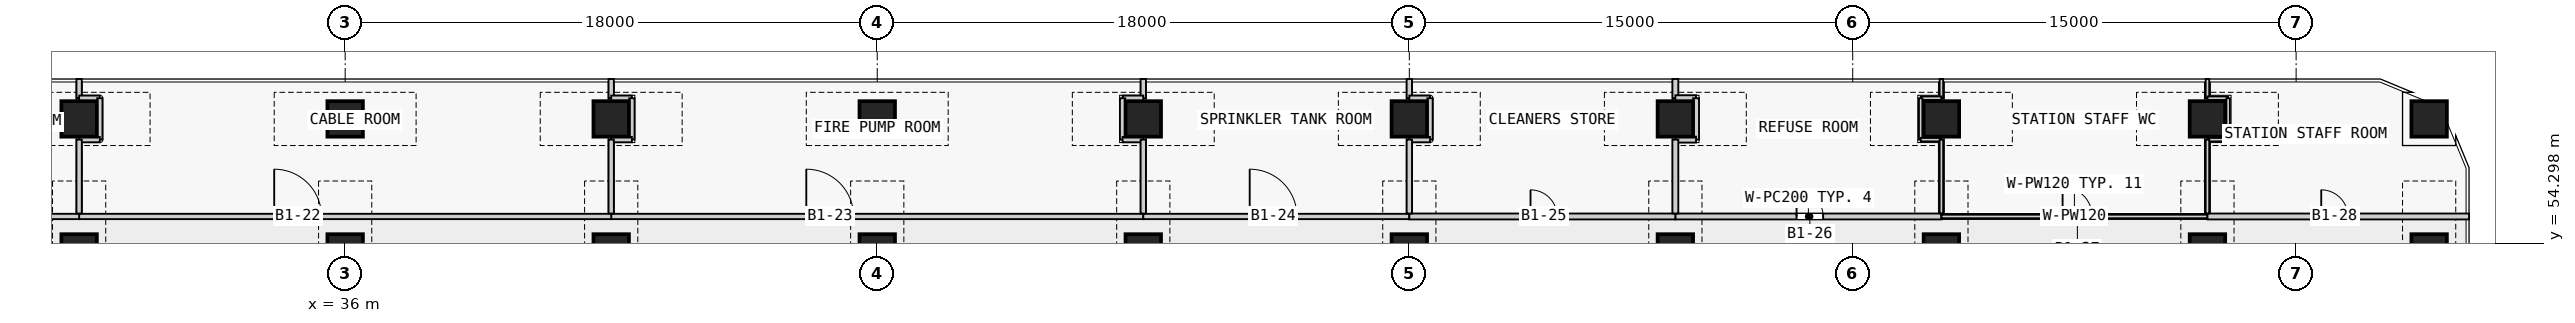
"""IFC4 building model, lengths in metres.
Left out: names, types, materials, properties, quantities, classifications, styles, units other than length and angle.
Written with IfcOpenShell. Run it as: python <this file> out.ifc"""

import sys

from ifc_helpers import new_model, si_unit, direction, frame, frame_2d, origin, origin_2d, place, context, subcontext, project, spatial, rectangle, extrude, element, fill, save


model = new_model("IFC4")
c1 = context("Model", 3, precision=1e-05, world=origin(), true_north=direction((0.0, 1.0)))
c2 = subcontext(c1, "Body", "Model", "MODEL_VIEW")
j1 = project(units=[si_unit("LENGTHUNIT", "METRE"), si_unit("PLANEANGLEUNIT", "RADIAN")], contexts=[c1])
p1 = place(None, origin())
s1 = spatial("IfcSite", under=j1, at=p1, CompositionType="ELEMENT")
p2 = place(p1, origin())
s2 = spatial("IfcBuilding", under=s1, at=p2, CompositionType="ELEMENT")
p3 = place(p2, frame((0.0, 0.0, -7.0)))
s3 = spatial("IfcBuildingStorey", under=s2, at=p3, CompositionType="ELEMENT", Elevation=-7.0)
for number, where, z_axis, x_axis in (
    (1, (27.0, 54.0, 0.0), (0.0, 0.0, 1.0), (1.0, 0.0, 0.0)),
    (2, (27.0, 58.5, 0.0), (0.0, 0.0, 1.0), (1.0, 0.0, 0.0)),
    (3, (36.0, 54.0, 0.0), (0.0, 0.0, 1.0), (1.0, 0.0, 0.0)),
    (4, (36.0, 58.5, 0.0), (0.0, 0.0, 1.0), (1.0, 0.0, 0.0)),
    (5, (45.0, 54.0, 0.0), (0.0, 0.0, 1.0), (1.0, 0.0, 0.0)),
    (6, (45.0, 58.5, 0.0), (0.0, 0.0, 1.0), (1.0, 0.0, 0.0)),
    (7, (54.0, 54.0, 0.0), (0.0, 0.0, 1.0), (1.0, 0.0, 0.0)),
    (8, (54.0, 58.5, 0.0), (0.0, 0.0, 1.0), (1.0, 0.0, 0.0)),
    (9, (63.0, 54.0, 0.0), (0.0, 0.0, 1.0), (1.0, 0.0, 0.0)),
    (10, (63.0, 58.5, 0.0), (0.0, 0.0, 1.0), (1.0, 0.0, 0.0)),
    (11, (72.0, 54.0, 0.0), (0.0, 0.0, 1.0), (1.0, 0.0, 0.0)),
    (12, (72.0, 58.5, 0.0), (0.0, 0.0, 1.0), (1.0, 0.0, 0.0)),
    (13, (81.0, 54.0, 0.0), (0.0, 0.0, 1.0), (1.0, 0.0, 0.0)),
    (14, (81.0, 58.5, 0.0), (0.0, 0.0, 1.0), (1.0, 0.0, 0.0)),
    (15, (90.0, 54.0, 0.0), (0.0, 0.0, 1.0), (1.0, 0.0, 0.0)),
    (16, (90.0, 58.5, 0.0), (0.0, 0.0, 1.0), (1.0, 0.0, 0.0)),
    (17, (99.0, 54.0, 0.0), (0.0, 0.0, 1.0), (1.0, 0.0, 0.0)),
    (18, (99.0, 58.5, 0.0), (0.0, 0.0, 1.0), (1.0, 0.0, 0.0)),
    (19, (106.5, 54.0, 0.0), (0.0, 0.0, 1.0), (1.0, 0.0, 0.0)),
    (20, (106.5, 58.5, 0.0), (0.0, 0.0, 1.0), (1.0, 0.0, 0.0)),
):
    element("IfcColumn", number, at=place(p3, frame(where, z_axis=z_axis, x_axis=x_axis)), inside=s3, PredefinedType="COLUMN", context=c2, shape_type="SweptSolid", body=[
        extrude(rectangle(XDim=1.2, YDim=1.2, at=origin_2d()), origin(), (0.0, 0.0, 1.0), 7.0),
    ])
p4 = place(p3, frame((45.0, 55.2, 0.0), z_axis=(0.0, 0.0, 1.0), x_axis=(1.0, 0.0, 0.0)))
e21 = element("IfcWall", 21, at=p4, inside=s3, PredefinedType="PARTITIONING", context=c2, shape_type="SweptSolid", body=[
    extrude(rectangle(XDim=18.0, YDim=0.18, at=frame_2d((9.0, 0.0))), origin(), (0.0, 0.0, 1.0), 6.55),
])
p5 = place(p4, frame((6.6, 0.0, 0.0)))
e22 = element("IfcOpeningElement", 22, at=p5, cuts=e21, PredefinedType="OPENING", context=c2, shape_type="SweptSolid", body=[
    extrude(rectangle(XDim=1.6, YDim=2.4, at=frame_2d((0.8, 1.2))), frame((0.0, 0.1, 0.0), z_axis=(0.0, -1.0, 0.0), x_axis=(1.0, 0.0, 0.0)), (0.0, 0.0, 1.0), 0.2),
])
p6 = place(p3, frame((27.0, 55.2, 0.0), z_axis=(0.0, 0.0, 1.0), x_axis=(1.0, 0.0, 0.0)))
e23 = element("IfcWall", 23, at=p6, inside=s3, PredefinedType="PARTITIONING", context=c2, shape_type="SweptSolid", body=[
    extrude(rectangle(XDim=18.0, YDim=0.18, at=frame_2d((9.0, 0.0))), origin(), (0.0, 0.0, 1.0), 6.55),
])
p7 = place(p6, frame((6.6, 0.0, 0.0)))
e24 = element("IfcOpeningElement", 24, at=p7, cuts=e23, PredefinedType="OPENING", context=c2, shape_type="SweptSolid", body=[
    extrude(rectangle(XDim=1.6, YDim=2.4, at=frame_2d((0.8, 1.2))), frame((0.0, 0.1, 0.0), z_axis=(0.0, -1.0, 0.0), x_axis=(1.0, 0.0, 0.0)), (0.0, 0.0, 1.0), 0.2),
])
p8 = place(p3, frame((9.0, 55.2, 0.0), z_axis=(0.0, 0.0, 1.0), x_axis=(1.0, 0.0, 0.0)))
e25 = element("IfcWall", 25, at=p8, inside=s3, PredefinedType="PARTITIONING", context=c2, shape_type="SweptSolid", body=[
    extrude(rectangle(XDim=18.0, YDim=0.18, at=frame_2d((9.0, 0.0))), origin(), (0.0, 0.0, 1.0), 6.55),
])
p9 = place(p8, frame((6.35, 0.0, 0.0)))
e26 = element("IfcOpeningElement", 26, at=p9, cuts=e25, PredefinedType="OPENING", context=c2, shape_type="SweptSolid", body=[
    extrude(rectangle(XDim=1.6, YDim=2.4, at=frame_2d((0.8, 1.2))), frame((0.0, 0.1, 0.0), z_axis=(0.0, -1.0, 0.0), x_axis=(1.0, 0.0, 0.0)), (0.0, 0.0, 1.0), 0.2),
])
p10 = place(p3, frame((81.0, 55.2, 0.0), z_axis=(0.0, 0.0, 1.0), x_axis=(1.0, 0.0, 0.0)))
e27 = element("IfcWall", 27, at=p10, inside=s3, PredefinedType="PARTITIONING", context=c2, shape_type="SweptSolid", body=[
    extrude(rectangle(XDim=9.0, YDim=0.2, at=frame_2d((4.5, 0.0))), origin(), (0.0, 0.0, 1.0), 6.55),
])
p11 = place(p10, frame((4.1, 0.0, 0.0)))
e28 = element("IfcOpeningElement", 28, at=p11, cuts=e27, PredefinedType="OPENING", context=c2, shape_type="SweptSolid", body=[
    extrude(rectangle(XDim=0.9, YDim=2.1, at=frame_2d((0.45, 1.05))), frame((0.0, 0.11, 0.0), z_axis=(0.0, -1.0, 0.0), x_axis=(1.0, 0.0, 0.0)), (0.0, 0.0, 1.0), 0.22),
])
p12 = place(p3, frame((63.0, 55.2, 0.0), z_axis=(0.0, 0.0, 1.0), x_axis=(1.0, 0.0, 0.0)))
e29 = element("IfcWall", 29, at=p12, inside=s3, PredefinedType="PARTITIONING", context=c2, shape_type="SweptSolid", body=[
    extrude(rectangle(XDim=9.0, YDim=0.18, at=frame_2d((4.5, 0.0))), origin(), (0.0, 0.0, 1.0), 6.55),
])
p13 = place(p12, frame((3.6, 0.0, 0.0)))
e30 = element("IfcOpeningElement", 30, at=p13, cuts=e29, PredefinedType="OPENING", context=c2, shape_type="SweptSolid", body=[
    extrude(rectangle(XDim=1.6, YDim=2.4, at=frame_2d((0.8, 1.2))), frame((0.0, 0.1, 0.0), z_axis=(0.0, -1.0, 0.0), x_axis=(1.0, 0.0, 0.0)), (0.0, 0.0, 1.0), 0.2),
])
p14 = place(p3, frame((90.0, 55.2, 0.0), z_axis=(0.0, 0.0, 1.0), x_axis=(1.0, 0.0, 0.0)))
e31 = element("IfcWall", 31, at=p14, inside=s3, PredefinedType="PARTITIONING", context=c2, shape_type="SweptSolid", body=[
    extrude(rectangle(XDim=9.0, YDim=0.12, at=frame_2d((4.5, 0.0))), origin(), (0.0, 0.0, 1.0), 6.55),
])
p15 = place(p14, frame((4.1, 0.0, 0.0)))
e32 = element("IfcOpeningElement", 32, at=p15, cuts=e31, PredefinedType="OPENING", context=c2, shape_type="SweptSolid", body=[
    extrude(rectangle(XDim=1.0, YDim=2.1, at=frame_2d((0.5, 1.05))), frame((0.0, 0.07, 0.0), z_axis=(0.0, -1.0, 0.0), x_axis=(1.0, 0.0, 0.0)), (0.0, 0.0, 1.0), 0.14),
])
p16 = place(p3, frame((72.0, 55.2, 0.0), z_axis=(0.0, 0.0, 1.0), x_axis=(1.0, 0.0, 0.0)))
e33 = element("IfcWall", 33, at=p16, inside=s3, PredefinedType="PARTITIONING", context=c2, shape_type="SweptSolid", body=[
    extrude(rectangle(XDim=9.0, YDim=0.2, at=frame_2d((4.5, 0.0))), origin(), (0.0, 0.0, 1.0), 6.55),
])
p17 = place(p16, frame((4.1, 0.0, 0.0)))
e34 = element("IfcOpeningElement", 34, at=p17, cuts=e33, PredefinedType="OPENING", context=c2, shape_type="SweptSolid", body=[
    extrude(rectangle(XDim=0.9, YDim=2.1, at=frame_2d((0.45, 1.05))), frame((0.0, 0.11, 0.0), z_axis=(0.0, -1.0, 0.0), x_axis=(1.0, 0.0, 0.0)), (0.0, 0.0, 1.0), 0.22),
])
p18 = place(p3, frame((99.0, 55.2, 0.0), z_axis=(0.0, 0.0, 1.0), x_axis=(1.0, 0.0, 0.0)))
e35 = element("IfcWall", 35, at=p18, inside=s3, PredefinedType="PARTITIONING", context=c2, shape_type="SweptSolid", body=[
    extrude(rectangle(XDim=8.85, YDim=0.2, at=frame_2d((4.425, 0.0))), origin(), (0.0, 0.0, 1.0), 6.55),
])
p19 = place(p18, frame((3.85, 0.0, 0.0)))
e36 = element("IfcOpeningElement", 36, at=p19, cuts=e35, PredefinedType="OPENING", context=c2, shape_type="SweptSolid", body=[
    extrude(rectangle(XDim=0.9, YDim=2.1, at=frame_2d((0.45, 1.05))), frame((0.0, 0.11, 0.0), z_axis=(0.0, -1.0, 0.0), x_axis=(1.0, 0.0, 0.0)), (0.0, 0.0, 1.0), 0.22),
])
p20 = place(p3, frame((63.0, 59.85, 0.0), z_axis=(0.0, 0.0, 1.0), x_axis=(0.0, -1.0, 0.0)))
e37 = element("IfcWall", 37, at=p20, inside=s3, PredefinedType="PARTITIONING", context=c2, shape_type="SweptSolid", body=[
    extrude(rectangle(XDim=0.65, YDim=0.18, at=frame_2d((0.325, 0.0))), origin(), (0.0, 0.0, 1.0), 6.55),
])
p21 = place(p3, frame((63.0, 59.2, 0.0), z_axis=(0.0, 0.0, 1.0), x_axis=(-1.0, 0.0, 0.0)))
e38 = element("IfcWall", 38, at=p21, inside=s3, PredefinedType="PARTITIONING", context=c2, shape_type="SweptSolid", body=[
    extrude(rectangle(XDim=0.7, YDim=0.18, at=frame_2d((0.35, 0.0))), origin(), (0.0, 0.0, 1.0), 6.55),
])
p22 = place(p3, frame((62.3, 59.2, 0.0), z_axis=(0.0, 0.0, 1.0), x_axis=(0.0, -1.0, 0.0)))
e39 = element("IfcWall", 39, at=p22, inside=s3, PredefinedType="PARTITIONING", context=c2, shape_type="SweptSolid", body=[
    extrude(rectangle(XDim=1.4, YDim=0.18, at=frame_2d((0.7, 0.0))), origin(), (0.0, 0.0, 1.0), 6.55),
])
p23 = place(p3, frame((62.3, 57.8, 0.0), z_axis=(0.0, 0.0, 1.0), x_axis=(1.0, 0.0, 0.0)))
e40 = element("IfcWall", 40, at=p23, inside=s3, PredefinedType="PARTITIONING", context=c2, shape_type="SweptSolid", body=[
    extrude(rectangle(XDim=0.7, YDim=0.18, at=frame_2d((0.35, 0.0))), origin(), (0.0, 0.0, 1.0), 6.55),
])
p24 = place(p3, frame((63.0, 57.8, 0.0), z_axis=(0.0, 0.0, 1.0), x_axis=(0.0, -1.0, 0.0)))
e41 = element("IfcWall", 41, at=p24, inside=s3, PredefinedType="PARTITIONING", context=c2, shape_type="SweptSolid", body=[
    extrude(rectangle(XDim=2.5, YDim=0.18, at=frame_2d((1.25, 0.0))), origin(), (0.0, 0.0, 1.0), 6.55),
])
p25 = place(p3, frame((90.0, 59.85, 0.0), z_axis=(0.0, 0.0, 1.0), x_axis=(0.0, -1.0, 0.0)))
e42 = element("IfcWall", 42, at=p25, inside=s3, PredefinedType="PARTITIONING", context=c2, shape_type="SweptSolid", body=[
    extrude(rectangle(XDim=0.65, YDim=0.12, at=frame_2d((0.325, 0.0))), origin(), (0.0, 0.0, 1.0), 6.55),
])
p26 = place(p3, frame((90.0, 59.2, 0.0), z_axis=(0.0, 0.0, 1.0), x_axis=(-1.0, 0.0, 0.0)))
e43 = element("IfcWall", 43, at=p26, inside=s3, PredefinedType="PARTITIONING", context=c2, shape_type="SweptSolid", body=[
    extrude(rectangle(XDim=0.7, YDim=0.12, at=frame_2d((0.35, 0.0))), origin(), (0.0, 0.0, 1.0), 6.55),
])
p27 = place(p3, frame((89.3, 59.2, 0.0), z_axis=(0.0, 0.0, 1.0), x_axis=(0.0, -1.0, 0.0)))
e44 = element("IfcWall", 44, at=p27, inside=s3, PredefinedType="PARTITIONING", context=c2, shape_type="SweptSolid", body=[
    extrude(rectangle(XDim=1.4, YDim=0.12, at=frame_2d((0.7, 0.0))), origin(), (0.0, 0.0, 1.0), 6.55),
])
p28 = place(p3, frame((89.3, 57.8, 0.0), z_axis=(0.0, 0.0, 1.0), x_axis=(1.0, 0.0, 0.0)))
e45 = element("IfcWall", 45, at=p28, inside=s3, PredefinedType="PARTITIONING", context=c2, shape_type="SweptSolid", body=[
    extrude(rectangle(XDim=0.7, YDim=0.12, at=frame_2d((0.35, 0.0))), origin(), (0.0, 0.0, 1.0), 6.55),
])
p29 = place(p3, frame((90.0, 57.8, 0.0), z_axis=(0.0, 0.0, 1.0), x_axis=(0.0, -1.0, 0.0)))
e46 = element("IfcWall", 46, at=p29, inside=s3, PredefinedType="PARTITIONING", context=c2, shape_type="SweptSolid", body=[
    extrude(rectangle(XDim=2.5, YDim=0.12, at=frame_2d((1.25, 0.0))), origin(), (0.0, 0.0, 1.0), 6.55),
])
p30 = place(p3, frame((45.0, 59.85, 0.0), z_axis=(0.0, 0.0, 1.0), x_axis=(0.0, -1.0, 0.0)))
e47 = element("IfcWall", 47, at=p30, inside=s3, PredefinedType="PARTITIONING", context=c2, shape_type="SweptSolid", body=[
    extrude(rectangle(XDim=0.65, YDim=0.18, at=frame_2d((0.325, 0.0))), origin(), (0.0, 0.0, 1.0), 6.55),
])
p31 = place(p3, frame((45.0, 59.2, 0.0), z_axis=(0.0, 0.0, 1.0), x_axis=(1.0, 0.0, 0.0)))
e48 = element("IfcWall", 48, at=p31, inside=s3, PredefinedType="PARTITIONING", context=c2, shape_type="SweptSolid", body=[
    extrude(rectangle(XDim=0.7, YDim=0.18, at=frame_2d((0.35, 0.0))), origin(), (0.0, 0.0, 1.0), 6.55),
])
p32 = place(p3, frame((45.7, 59.2, 0.0), z_axis=(0.0, 0.0, 1.0), x_axis=(0.0, -1.0, 0.0)))
e49 = element("IfcWall", 49, at=p32, inside=s3, PredefinedType="PARTITIONING", context=c2, shape_type="SweptSolid", body=[
    extrude(rectangle(XDim=1.4, YDim=0.18, at=frame_2d((0.7, 0.0))), origin(), (0.0, 0.0, 1.0), 6.55),
])
p33 = place(p3, frame((45.7, 57.8, 0.0), z_axis=(0.0, 0.0, 1.0), x_axis=(-1.0, 0.0, 0.0)))
e50 = element("IfcWall", 50, at=p33, inside=s3, PredefinedType="PARTITIONING", context=c2, shape_type="SweptSolid", body=[
    extrude(rectangle(XDim=0.7, YDim=0.18, at=frame_2d((0.35, 0.0))), origin(), (0.0, 0.0, 1.0), 6.55),
])
p34 = place(p3, frame((45.0, 57.8, 0.0), z_axis=(0.0, 0.0, 1.0), x_axis=(0.0, -1.0, 0.0)))
e51 = element("IfcWall", 51, at=p34, inside=s3, PredefinedType="PARTITIONING", context=c2, shape_type="SweptSolid", body=[
    extrude(rectangle(XDim=2.5, YDim=0.18, at=frame_2d((1.25, 0.0))), origin(), (0.0, 0.0, 1.0), 6.55),
])
p35 = place(p3, frame((81.0, 59.85, 0.0), z_axis=(0.0, 0.0, 1.0), x_axis=(0.0, -1.0, 0.0)))
e52 = element("IfcWall", 52, at=p35, inside=s3, PredefinedType="PARTITIONING", context=c2, shape_type="SweptSolid", body=[
    extrude(rectangle(XDim=0.65, YDim=0.2, at=frame_2d((0.325, 0.0))), origin(), (0.0, 0.0, 1.0), 6.55),
])
p36 = place(p3, frame((81.0, 59.2, 0.0), z_axis=(0.0, 0.0, 1.0), x_axis=(1.0, 0.0, 0.0)))
e53 = element("IfcWall", 53, at=p36, inside=s3, PredefinedType="PARTITIONING", context=c2, shape_type="SweptSolid", body=[
    extrude(rectangle(XDim=0.7, YDim=0.2, at=frame_2d((0.35, 0.0))), origin(), (0.0, 0.0, 1.0), 6.55),
])
p37 = place(p3, frame((81.7, 59.2, 0.0), z_axis=(0.0, 0.0, 1.0), x_axis=(0.0, -1.0, 0.0)))
e54 = element("IfcWall", 54, at=p37, inside=s3, PredefinedType="PARTITIONING", context=c2, shape_type="SweptSolid", body=[
    extrude(rectangle(XDim=1.4, YDim=0.2, at=frame_2d((0.7, 0.0))), origin(), (0.0, 0.0, 1.0), 6.55),
])
p38 = place(p3, frame((81.7, 57.8, 0.0), z_axis=(0.0, 0.0, 1.0), x_axis=(-1.0, 0.0, 0.0)))
e55 = element("IfcWall", 55, at=p38, inside=s3, PredefinedType="PARTITIONING", context=c2, shape_type="SweptSolid", body=[
    extrude(rectangle(XDim=0.7, YDim=0.2, at=frame_2d((0.35, 0.0))), origin(), (0.0, 0.0, 1.0), 6.55),
])
p39 = place(p3, frame((81.0, 57.8, 0.0), z_axis=(0.0, 0.0, 1.0), x_axis=(0.0, -1.0, 0.0)))
e56 = element("IfcWall", 56, at=p39, inside=s3, PredefinedType="PARTITIONING", context=c2, shape_type="SweptSolid", body=[
    extrude(rectangle(XDim=2.5, YDim=0.2, at=frame_2d((1.25, 0.0))), origin(), (0.0, 0.0, 1.0), 6.55),
])
p40 = place(p3, frame((27.0, 59.85, 0.0), z_axis=(0.0, 0.0, 1.0), x_axis=(0.0, -1.0, 0.0)))
e57 = element("IfcWall", 57, at=p40, inside=s3, PredefinedType="PARTITIONING", context=c2, shape_type="SweptSolid", body=[
    extrude(rectangle(XDim=0.65, YDim=0.18, at=frame_2d((0.325, 0.0))), origin(), (0.0, 0.0, 1.0), 6.55),
])
p41 = place(p3, frame((27.0, 59.2, 0.0), z_axis=(0.0, 0.0, 1.0), x_axis=(1.0, 0.0, 0.0)))
e58 = element("IfcWall", 58, at=p41, inside=s3, PredefinedType="PARTITIONING", context=c2, shape_type="SweptSolid", body=[
    extrude(rectangle(XDim=0.7, YDim=0.18, at=frame_2d((0.35, 0.0))), origin(), (0.0, 0.0, 1.0), 6.55),
])
p42 = place(p3, frame((27.7, 59.2, 0.0), z_axis=(0.0, 0.0, 1.0), x_axis=(0.0, -1.0, 0.0)))
e59 = element("IfcWall", 59, at=p42, inside=s3, PredefinedType="PARTITIONING", context=c2, shape_type="SweptSolid", body=[
    extrude(rectangle(XDim=1.4, YDim=0.18, at=frame_2d((0.7, 0.0))), origin(), (0.0, 0.0, 1.0), 6.55),
])
p43 = place(p3, frame((27.7, 57.8, 0.0), z_axis=(0.0, 0.0, 1.0), x_axis=(-1.0, 0.0, 0.0)))
e60 = element("IfcWall", 60, at=p43, inside=s3, PredefinedType="PARTITIONING", context=c2, shape_type="SweptSolid", body=[
    extrude(rectangle(XDim=0.7, YDim=0.18, at=frame_2d((0.35, 0.0))), origin(), (0.0, 0.0, 1.0), 6.55),
])
p44 = place(p3, frame((27.0, 57.8, 0.0), z_axis=(0.0, 0.0, 1.0), x_axis=(0.0, -1.0, 0.0)))
e61 = element("IfcWall", 61, at=p44, inside=s3, PredefinedType="PARTITIONING", context=c2, shape_type="SweptSolid", body=[
    extrude(rectangle(XDim=2.5, YDim=0.18, at=frame_2d((1.25, 0.0))), origin(), (0.0, 0.0, 1.0), 6.55),
])
p45 = place(p3, frame((99.0, 59.85, 0.0), z_axis=(0.0, 0.0, 1.0), x_axis=(0.0, -1.0, 0.0)))
e62 = element("IfcWall", 62, at=p45, inside=s3, PredefinedType="PARTITIONING", context=c2, shape_type="SweptSolid", body=[
    extrude(rectangle(XDim=0.65, YDim=0.12, at=frame_2d((0.325, 0.0))), origin(), (0.0, 0.0, 1.0), 6.55),
])
p46 = place(p3, frame((99.0, 59.2, 0.0), z_axis=(0.0, 0.0, 1.0), x_axis=(1.0, 0.0, 0.0)))
e63 = element("IfcWall", 63, at=p46, inside=s3, PredefinedType="PARTITIONING", context=c2, shape_type="SweptSolid", body=[
    extrude(rectangle(XDim=0.7, YDim=0.12, at=frame_2d((0.35, 0.0))), origin(), (0.0, 0.0, 1.0), 6.55),
])
p47 = place(p3, frame((99.7, 59.2, 0.0), z_axis=(0.0, 0.0, 1.0), x_axis=(0.0, -1.0, 0.0)))
e64 = element("IfcWall", 64, at=p47, inside=s3, PredefinedType="PARTITIONING", context=c2, shape_type="SweptSolid", body=[
    extrude(rectangle(XDim=1.4, YDim=0.12, at=frame_2d((0.7, 0.0))), origin(), (0.0, 0.0, 1.0), 6.55),
])
p48 = place(p3, frame((99.7, 57.8, 0.0), z_axis=(0.0, 0.0, 1.0), x_axis=(-1.0, 0.0, 0.0)))
e65 = element("IfcWall", 65, at=p48, inside=s3, PredefinedType="PARTITIONING", context=c2, shape_type="SweptSolid", body=[
    extrude(rectangle(XDim=0.7, YDim=0.12, at=frame_2d((0.35, 0.0))), origin(), (0.0, 0.0, 1.0), 6.55),
])
p49 = place(p3, frame((99.0, 57.8, 0.0), z_axis=(0.0, 0.0, 1.0), x_axis=(0.0, -1.0, 0.0)))
e66 = element("IfcWall", 66, at=p49, inside=s3, PredefinedType="PARTITIONING", context=c2, shape_type="SweptSolid", body=[
    extrude(rectangle(XDim=2.5, YDim=0.12, at=frame_2d((1.25, 0.0))), origin(), (0.0, 0.0, 1.0), 6.55),
])
p50 = place(p3, frame((72.0, 59.85, 0.0), z_axis=(0.0, 0.0, 1.0), x_axis=(0.0, -1.0, 0.0)))
e67 = element("IfcWall", 67, at=p50, inside=s3, PredefinedType="PARTITIONING", context=c2, shape_type="SweptSolid", body=[
    extrude(rectangle(XDim=0.65, YDim=0.18, at=frame_2d((0.325, 0.0))), origin(), (0.0, 0.0, 1.0), 6.55),
])
p51 = place(p3, frame((72.0, 59.2, 0.0), z_axis=(0.0, 0.0, 1.0), x_axis=(1.0, 0.0, 0.0)))
e68 = element("IfcWall", 68, at=p51, inside=s3, PredefinedType="PARTITIONING", context=c2, shape_type="SweptSolid", body=[
    extrude(rectangle(XDim=0.7, YDim=0.18, at=frame_2d((0.35, 0.0))), origin(), (0.0, 0.0, 1.0), 6.55),
])
p52 = place(p3, frame((72.7, 59.2, 0.0), z_axis=(0.0, 0.0, 1.0), x_axis=(0.0, -1.0, 0.0)))
e69 = element("IfcWall", 69, at=p52, inside=s3, PredefinedType="PARTITIONING", context=c2, shape_type="SweptSolid", body=[
    extrude(rectangle(XDim=1.4, YDim=0.18, at=frame_2d((0.7, 0.0))), origin(), (0.0, 0.0, 1.0), 6.55),
])
p53 = place(p3, frame((72.7, 57.8, 0.0), z_axis=(0.0, 0.0, 1.0), x_axis=(-1.0, 0.0, 0.0)))
e70 = element("IfcWall", 70, at=p53, inside=s3, PredefinedType="PARTITIONING", context=c2, shape_type="SweptSolid", body=[
    extrude(rectangle(XDim=0.7, YDim=0.18, at=frame_2d((0.35, 0.0))), origin(), (0.0, 0.0, 1.0), 6.55),
])
p54 = place(p3, frame((72.0, 57.8, 0.0), z_axis=(0.0, 0.0, 1.0), x_axis=(0.0, -1.0, 0.0)))
e71 = element("IfcWall", 71, at=p54, inside=s3, PredefinedType="PARTITIONING", context=c2, shape_type="SweptSolid", body=[
    extrude(rectangle(XDim=2.5, YDim=0.18, at=frame_2d((1.25, 0.0))), origin(), (0.0, 0.0, 1.0), 6.55),
])
p55 = place(p7, origin())
e72 = element("IfcDoor", 72, at=p55, inside=s3, OperationType="SINGLE_SWING_LEFT", PredefinedType="DOOR", context=c2, shape_type="SweptSolid", body=[
    extrude(rectangle(XDim=1.6, YDim=2.4, at=frame_2d((0.8, 1.2))), frame((0.0, 0.025, 0.0), z_axis=(0.0, -1.0, 0.0), x_axis=(1.0, 0.0, 0.0)), (0.0, 0.0, 1.0), 0.05),
])
fill(e24, e72)
p56 = place(p5, origin())
e73 = element("IfcDoor", 73, at=p56, inside=s3, OperationType="SINGLE_SWING_LEFT", PredefinedType="DOOR", context=c2, shape_type="SweptSolid", body=[
    extrude(rectangle(XDim=1.6, YDim=2.4, at=frame_2d((0.8, 1.2))), frame((0.0, 0.025, 0.0), z_axis=(0.0, -1.0, 0.0), x_axis=(1.0, 0.0, 0.0)), (0.0, 0.0, 1.0), 0.05),
])
fill(e22, e73)
p57 = place(p13, origin())
e74 = element("IfcDoor", 74, at=p57, inside=s3, OperationType="SINGLE_SWING_LEFT", PredefinedType="DOOR", context=c2, shape_type="SweptSolid", body=[
    extrude(rectangle(XDim=1.6, YDim=2.4, at=frame_2d((0.8, 1.2))), frame((0.0, 0.025, 0.0), z_axis=(0.0, -1.0, 0.0), x_axis=(1.0, 0.0, 0.0)), (0.0, 0.0, 1.0), 0.05),
])
fill(e30, e74)
p58 = place(p17, origin())
e75 = element("IfcDoor", 75, at=p58, inside=s3, OperationType="SINGLE_SWING_LEFT", PredefinedType="DOOR", context=c2, shape_type="SweptSolid", body=[
    extrude(rectangle(XDim=0.9, YDim=2.1, at=frame_2d((0.45, 1.05))), frame((0.0, 0.025, 0.0), z_axis=(0.0, -1.0, 0.0), x_axis=(1.0, 0.0, 0.0)), (0.0, 0.0, 1.0), 0.05),
])
fill(e34, e75)
p59 = place(p11, origin())
e76 = element("IfcDoor", 76, at=p59, inside=s3, OperationType="SINGLE_SWING_LEFT", PredefinedType="DOOR", context=c2, shape_type="SweptSolid", body=[
    extrude(rectangle(XDim=0.9, YDim=2.1, at=frame_2d((0.45, 1.05))), frame((0.0, 0.025, 0.0), z_axis=(0.0, -1.0, 0.0), x_axis=(1.0, 0.0, 0.0)), (0.0, 0.0, 1.0), 0.05),
])
fill(e28, e76)
p60 = place(p15, origin())
e77 = element("IfcDoor", 77, at=p60, inside=s3, OperationType="SINGLE_SWING_LEFT", PredefinedType="DOOR", context=c2, shape_type="SweptSolid", body=[
    extrude(rectangle(XDim=1.0, YDim=2.1, at=frame_2d((0.5, 1.05))), frame((0.0, 0.025, 0.0), z_axis=(0.0, -1.0, 0.0), x_axis=(1.0, 0.0, 0.0)), (0.0, 0.0, 1.0), 0.05),
])
fill(e32, e77)
p61 = place(p19, origin())
e78 = element("IfcDoor", 78, at=p61, inside=s3, OperationType="SINGLE_SWING_LEFT", PredefinedType="DOOR", context=c2, shape_type="SweptSolid", body=[
    extrude(rectangle(XDim=0.9, YDim=2.1, at=frame_2d((0.45, 1.05))), frame((0.0, 0.025, 0.0), z_axis=(0.0, -1.0, 0.0), x_axis=(1.0, 0.0, 0.0)), (0.0, 0.0, 1.0), 0.05),
])
fill(e36, e78)
save(model, sys.argv[1])
